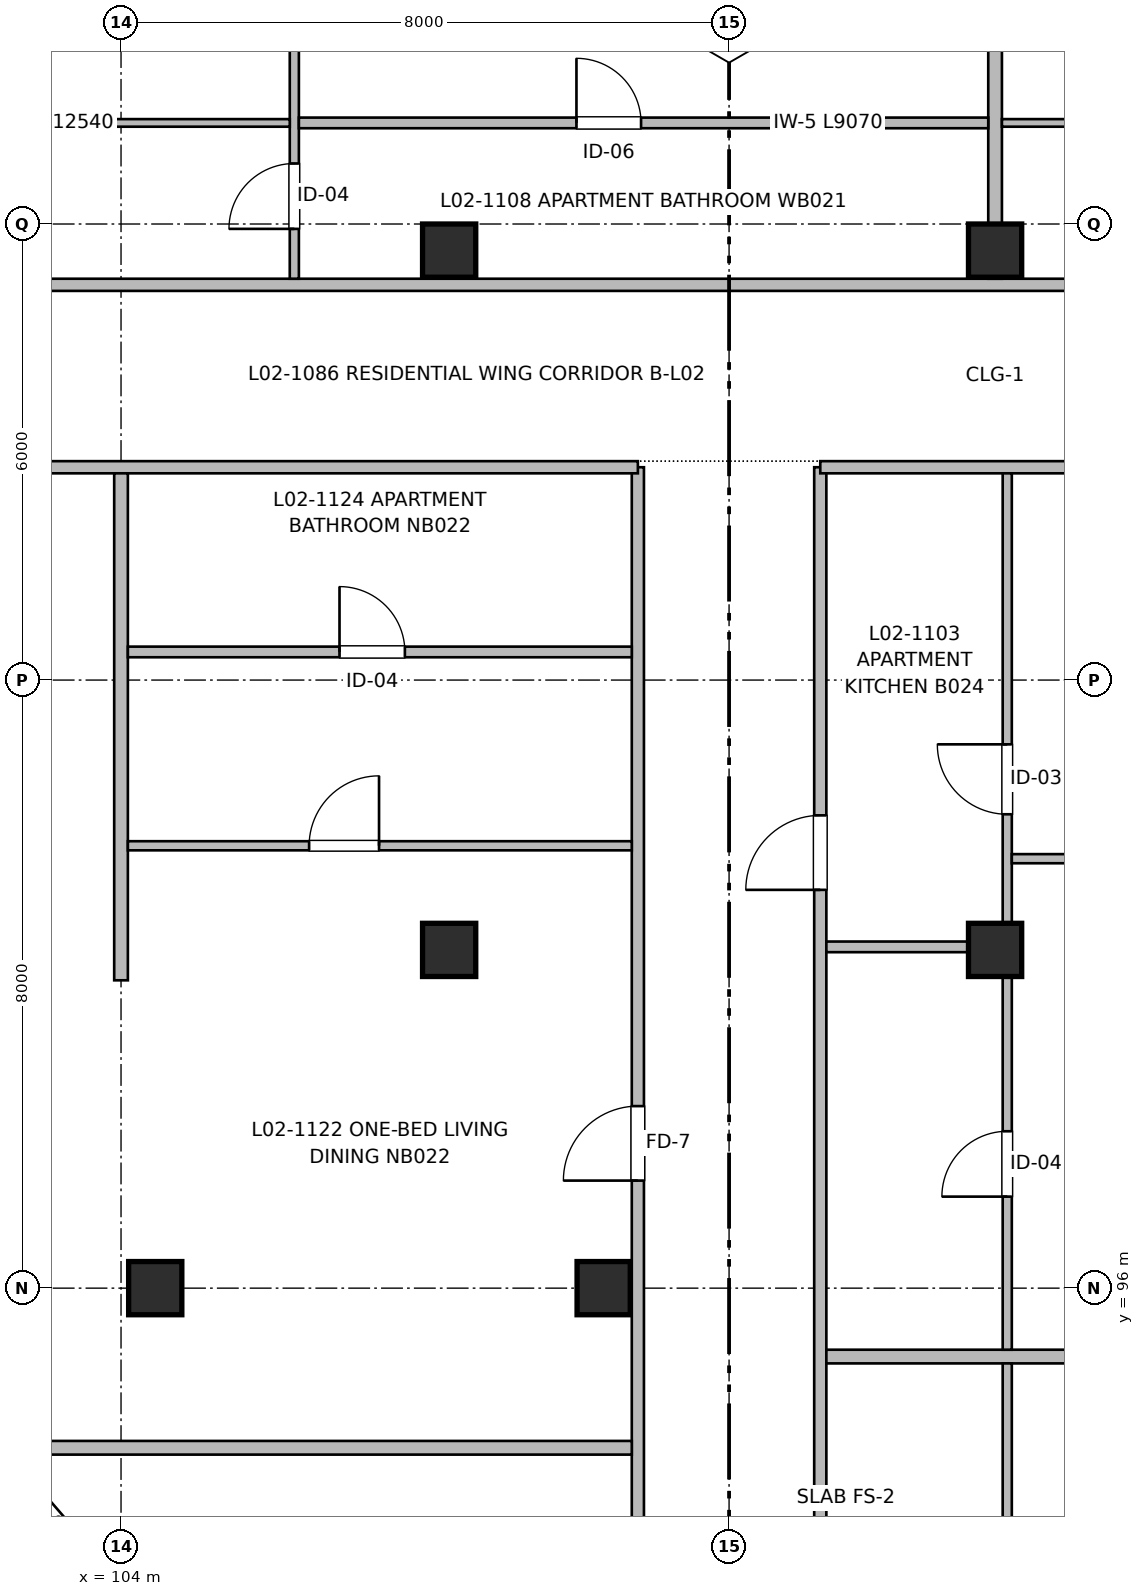
"""IFC4 building model, lengths in metres.
Left out: names, types, materials, properties, quantities, classifications, styles, units other than length and angle.
Written with IfcOpenShell. Run it as: python <this file> out.ifc"""

import sys

from ifc_helpers import new_model, si_unit, direction, frame, frame_2d, origin, origin_2d, place, context, subcontext, project, spatial, rectangle, extrude, element, fill, save


model = new_model("IFC4")
c1 = context("Model", 3, precision=1e-05, world=origin(), true_north=direction((0.0, 1.0)))
c2 = subcontext(c1, "Body", "Model", "MODEL_VIEW")
j1 = project(units=[si_unit("LENGTHUNIT", "METRE"), si_unit("PLANEANGLEUNIT", "RADIAN")], contexts=[c1])
p1 = place(None, origin())
s1 = spatial("IfcSite", under=j1, at=p1, CompositionType="ELEMENT")
p2 = place(p1, origin())
s2 = spatial("IfcBuilding", under=s1, at=p2, CompositionType="ELEMENT")
p3 = place(p2, frame((0.0, 0.0, 7.36)))
s3 = spatial("IfcBuildingStorey", under=s2, at=p3, CompositionType="ELEMENT", Elevation=7.36)
for number, where, z_axis, x_axis in (
    (1, (104.45, 96.0, 0.0), (0.0, 0.0, 1.0), (1.0, 0.0, 0.0)),
    (2, (108.317, 100.45, 0.0), (0.0, 0.0, 1.0), (1.0, 0.0, 0.0)),
    (3, (108.317, 109.65, 0.0), (0.0, 0.0, 1.0), (1.0, 0.0, 0.0)),
    (4, (110.35, 96.0, 0.0), (0.0, 0.0, 1.0), (1.0, 0.0, 0.0)),
    (5, (115.5, 100.45, 0.0), (0.0, 0.0, 1.0), (1.0, 0.0, 0.0)),
    (6, (115.5, 109.65, 0.0), (0.0, 0.0, 1.0), (1.0, 0.0, 0.0)),
):
    element("IfcColumn", number, at=place(p3, frame(where, z_axis=z_axis, x_axis=x_axis)), inside=s3, PredefinedType="COLUMN", context=c2, shape_type="SweptSolid", body=[
        extrude(rectangle(XDim=0.7, YDim=0.7, at=origin_2d()), origin(), (0.0, 0.0, 1.0), 3.2),
    ])
p4 = place(p3, frame((110.8, 56.18, 0.0), z_axis=(0.0, 0.0, 1.0), x_axis=(0.0, 1.0, 0.0)))
e7 = element("IfcWall", 7, at=p4, inside=s3, PredefinedType="PARTITIONING", context=c2, shape_type="SweptSolid", body=[
    extrude(rectangle(XDim=50.62, YDim=0.16, at=frame_2d((25.31, 0.0))), origin(), (0.0, 0.0, 1.0), 2.935),
])
p5 = place(p4, frame((12.82, 0.0, 0.0)))
e8 = element("IfcOpeningElement", 8, at=p5, cuts=e7, PredefinedType="OPENING", context=c2, shape_type="SweptSolid", body=[
    extrude(rectangle(XDim=1.1, YDim=2.15, at=frame_2d((0.55, 1.075))), frame((0.0, 0.09, 0.0), z_axis=(0.0, -1.0, 0.0), x_axis=(1.0, 0.0, 0.0)), (0.0, 0.0, 1.0), 0.18),
])
p6 = place(p4, frame((19.22, 0.0, 0.0)))
e9 = element("IfcOpeningElement", 9, at=p6, cuts=e7, PredefinedType="OPENING", context=c2, shape_type="SweptSolid", body=[
    extrude(rectangle(XDim=1.6, YDim=2.15, at=frame_2d((0.8, 1.075))), frame((0.0, 0.09, 0.0), z_axis=(0.0, -1.0, 0.0), x_axis=(1.0, 0.0, 0.0)), (0.0, 0.0, 1.0), 0.18),
])
p7 = place(p4, frame((1.8, 0.0, 0.0)))
e10 = element("IfcOpeningElement", 10, at=p7, cuts=e7, PredefinedType="OPENING", context=c2, shape_type="SweptSolid", body=[
    extrude(rectangle(XDim=0.96, YDim=2.15, at=frame_2d((0.48, 1.075))), frame((0.0, 0.09, 0.0), z_axis=(0.0, -1.0, 0.0), x_axis=(1.0, 0.0, 0.0)), (0.0, 0.0, 1.0), 0.18),
])
p8 = place(p4, frame((32.625, 0.0, 0.0)))
e11 = element("IfcOpeningElement", 11, at=p8, cuts=e7, PredefinedType="OPENING", context=c2, shape_type="SweptSolid", body=[
    extrude(rectangle(XDim=0.98, YDim=2.15, at=frame_2d((0.49, 1.075))), frame((0.0, 0.09, 0.0), z_axis=(0.0, -1.0, 0.0), x_axis=(1.0, 0.0, 0.0)), (0.0, 0.0, 1.0), 0.18),
])
p9 = place(p4, frame((41.235, 0.0, 0.0)))
e12 = element("IfcOpeningElement", 12, at=p9, cuts=e7, PredefinedType="OPENING", context=c2, shape_type="SweptSolid", body=[
    extrude(rectangle(XDim=0.98, YDim=2.15, at=frame_2d((0.49, 1.075))), frame((0.0, 0.09, 0.0), z_axis=(0.0, -1.0, 0.0), x_axis=(1.0, 0.0, 0.0)), (0.0, 0.0, 1.0), 0.18),
])
p10 = place(p3, frame((113.2, 56.18, 0.0), z_axis=(0.0, 0.0, 1.0), x_axis=(0.0, 1.0, 0.0)))
e13 = element("IfcWall", 13, at=p10, inside=s3, PredefinedType="PARTITIONING", context=c2, shape_type="SweptSolid", body=[
    extrude(rectangle(XDim=50.62, YDim=0.16, at=frame_2d((25.31, 0.0))), origin(), (0.0, 0.0, 1.0), 2.935),
])
p11 = place(p10, frame((6.99, 0.0, 0.0)))
e14 = element("IfcOpeningElement", 14, at=p11, cuts=e13, PredefinedType="OPENING", context=c2, shape_type="SweptSolid", body=[
    extrude(rectangle(XDim=0.98, YDim=2.15, at=frame_2d((0.49, 1.075))), frame((0.0, 0.09, 0.0), z_axis=(0.0, -1.0, 0.0), x_axis=(1.0, 0.0, 0.0)), (0.0, 0.0, 1.0), 0.18),
])
p12 = place(p10, frame((20.92, 0.0, 0.0)))
e15 = element("IfcOpeningElement", 15, at=p12, cuts=e13, PredefinedType="OPENING", context=c2, shape_type="SweptSolid", body=[
    extrude(rectangle(XDim=0.98, YDim=2.15, at=frame_2d((0.49, 1.075))), frame((0.0, 0.09, 0.0), z_axis=(0.0, -1.0, 0.0), x_axis=(1.0, 0.0, 0.0)), (0.0, 0.0, 1.0), 0.18),
])
p13 = place(p10, frame((33.67, 0.0, 0.0)))
e16 = element("IfcOpeningElement", 16, at=p13, cuts=e13, PredefinedType="OPENING", context=c2, shape_type="SweptSolid", body=[
    extrude(rectangle(XDim=0.98, YDim=2.15, at=frame_2d((0.49, 1.075))), frame((0.0, 0.09, 0.0), z_axis=(0.0, -1.0, 0.0), x_axis=(1.0, 0.0, 0.0)), (0.0, 0.0, 1.0), 0.18),
])
p14 = place(p10, frame((45.06, 0.0, 0.0)))
e17 = element("IfcOpeningElement", 17, at=p14, cuts=e13, PredefinedType="OPENING", context=c2, shape_type="SweptSolid", body=[
    extrude(rectangle(XDim=0.98, YDim=2.15, at=frame_2d((0.49, 1.075))), frame((0.0, 0.09, 0.0), z_axis=(0.0, -1.0, 0.0), x_axis=(1.0, 0.0, 0.0)), (0.0, 0.0, 1.0), 0.18),
])
p15 = place(p3, frame((93.68, 106.8, 0.0), z_axis=(0.0, 0.0, 1.0), x_axis=(1.0, 0.0, 0.0)))
e18 = element("IfcWall", 18, at=p15, inside=s3, PredefinedType="PARTITIONING", context=c2, shape_type="SweptSolid", body=[
    extrude(rectangle(XDim=17.12, YDim=0.16, at=frame_2d((8.56, 0.0))), origin(), (0.0, 0.0, 1.0), 2.935),
])
p16 = place(p3, frame((113.2, 106.8, 0.0), z_axis=(0.0, 0.0, 1.0), x_axis=(1.0, 0.0, 0.0)))
e19 = element("IfcWall", 19, at=p16, inside=s3, PredefinedType="PARTITIONING", context=c2, shape_type="SweptSolid", body=[
    extrude(rectangle(XDim=24.12, YDim=0.16, at=frame_2d((12.06, 0.0))), origin(), (0.0, 0.0, 1.0), 2.935),
])
p17 = place(p16, frame((19.575, 0.0, 0.0)))
e20 = element("IfcOpeningElement", 20, at=p17, cuts=e19, PredefinedType="OPENING", context=c2, shape_type="SweptSolid", body=[
    extrude(rectangle(XDim=1.05, YDim=2.15, at=frame_2d((0.525, 1.075))), frame((0.0, 0.09, 0.0), z_axis=(0.0, -1.0, 0.0), x_axis=(1.0, 0.0, 0.0)), (0.0, 0.0, 1.0), 0.18),
])
p18 = place(p16, frame((8.995, 0.0, 0.0)))
e21 = element("IfcOpeningElement", 21, at=p18, cuts=e19, PredefinedType="OPENING", context=c2, shape_type="SweptSolid", body=[
    extrude(rectangle(XDim=0.98, YDim=2.15, at=frame_2d((0.49, 1.075))), frame((0.0, 0.09, 0.0), z_axis=(0.0, -1.0, 0.0), x_axis=(1.0, 0.0, 0.0)), (0.0, 0.0, 1.0), 0.18),
])
p19 = place(p3, frame((93.68, 109.2, 0.0), z_axis=(0.0, 0.0, 1.0), x_axis=(1.0, 0.0, 0.0)))
e22 = element("IfcWall", 22, at=p19, inside=s3, PredefinedType="PARTITIONING", context=c2, shape_type="SweptSolid", body=[
    extrude(rectangle(XDim=43.64, YDim=0.16, at=frame_2d((21.82, 0.0))), origin(), (0.0, 0.0, 1.0), 2.935),
])
p20 = place(p19, frame((5.41, 0.0, 0.0)))
e23 = element("IfcOpeningElement", 23, at=p20, cuts=e22, PredefinedType="OPENING", context=c2, shape_type="SweptSolid", body=[
    extrude(rectangle(XDim=0.98, YDim=2.15, at=frame_2d((0.49, 1.075))), frame((0.0, 0.09, 0.0), z_axis=(0.0, -1.0, 0.0), x_axis=(1.0, 0.0, 0.0)), (0.0, 0.0, 1.0), 0.18),
])
p21 = place(p19, frame((27.32, 0.0, 0.0)))
e24 = element("IfcOpeningElement", 24, at=p21, cuts=e22, PredefinedType="OPENING", context=c2, shape_type="SweptSolid", body=[
    extrude(rectangle(XDim=0.98, YDim=2.15, at=frame_2d((0.49, 1.075))), frame((0.0, 0.09, 0.0), z_axis=(0.0, -1.0, 0.0), x_axis=(1.0, 0.0, 0.0)), (0.0, 0.0, 1.0), 0.18),
])
p22 = place(p3, frame((104.0, 100.05, 0.0), z_axis=(0.0, 0.0, 1.0), x_axis=(0.0, 1.0, 0.0)))
e25 = element("IfcWall", 25, at=p22, inside=s3, PredefinedType="PARTITIONING", context=c2, shape_type="SweptSolid", body=[
    extrude(rectangle(XDim=6.67, YDim=0.18, at=frame_2d((3.335, 0.0))), origin(), (0.0, 0.0, 1.0), 2.935),
])
p23 = place(p3, frame((113.28, 95.1, 0.0), z_axis=(0.0, 0.0, 1.0), x_axis=(1.0, 0.0, 0.0)))
e26 = element("IfcWall", 26, at=p23, inside=s3, PredefinedType="PARTITIONING", context=c2, shape_type="SweptSolid", body=[
    extrude(rectangle(XDim=12.887, YDim=0.18, at=frame_2d((6.444, 0.0))), origin(), (0.0, 0.0, 1.0), 2.935),
])
p24 = place(p3, frame((115.66, 84.07, 0.0), z_axis=(0.0, 0.0, 1.0), x_axis=(0.0, 1.0, 0.0)))
e27 = element("IfcWall", 27, at=p24, inside=s3, PredefinedType="PARTITIONING", context=c2, shape_type="SweptSolid", body=[
    extrude(rectangle(XDim=10.94, YDim=0.12, at=frame_2d((5.47, 0.0))), origin(), (0.0, 0.0, 1.0), 2.935),
])
p25 = place(p24, frame((1.911, 0.0, 0.0)))
e28 = element("IfcOpeningElement", 28, at=p25, cuts=e27, PredefinedType="OPENING", context=c2, shape_type="SweptSolid", body=[
    extrude(rectangle(XDim=0.86, YDim=2.1, at=frame_2d((0.43, 1.05))), frame((0.0, 0.07, 0.0), z_axis=(0.0, -1.0, 0.0), x_axis=(1.0, 0.0, 0.0)), (0.0, 0.0, 1.0), 0.14),
])
p26 = place(p24, frame((6.685, 0.0, 0.0)))
e29 = element("IfcOpeningElement", 29, at=p26, cuts=e27, PredefinedType="OPENING", context=c2, shape_type="SweptSolid", body=[
    extrude(rectangle(XDim=0.92, YDim=2.1, at=frame_2d((0.46, 1.05))), frame((0.0, 0.07, 0.0), z_axis=(0.0, -1.0, 0.0), x_axis=(1.0, 0.0, 0.0)), (0.0, 0.0, 1.0), 0.14),
])
p27 = place(p3, frame((115.66, 95.19, 0.0), z_axis=(0.0, 0.0, 1.0), x_axis=(0.0, 1.0, 0.0)))
e30 = element("IfcWall", 30, at=p27, inside=s3, PredefinedType="PARTITIONING", context=c2, shape_type="SweptSolid", body=[
    extrude(rectangle(XDim=11.53, YDim=0.12, at=frame_2d((5.765, 0.0))), origin(), (0.0, 0.0, 1.0), 2.68),
])
p28 = place(p27, frame((2.014, 0.0, 0.0)))
e31 = element("IfcOpeningElement", 31, at=p28, cuts=e30, PredefinedType="OPENING", context=c2, shape_type="SweptSolid", body=[
    extrude(rectangle(XDim=0.86, YDim=2.1, at=frame_2d((0.43, 1.05))), frame((0.0, 0.07, 0.0), z_axis=(0.0, -1.0, 0.0), x_axis=(1.0, 0.0, 0.0)), (0.0, 0.0, 1.0), 0.14),
])
p29 = place(p27, frame((7.044, 0.0, 0.0)))
e32 = element("IfcOpeningElement", 32, at=p29, cuts=e30, PredefinedType="OPENING", context=c2, shape_type="SweptSolid", body=[
    extrude(rectangle(XDim=0.92, YDim=2.1, at=frame_2d((0.46, 1.05))), frame((0.0, 0.07, 0.0), z_axis=(0.0, -1.0, 0.0), x_axis=(1.0, 0.0, 0.0)), (0.0, 0.0, 1.0), 0.14),
])
p30 = place(p3, frame((113.28, 100.49, 0.0), z_axis=(0.0, 0.0, 1.0), x_axis=(1.0, 0.0, 0.0)))
e33 = element("IfcWall", 33, at=p30, inside=s3, PredefinedType="PARTITIONING", context=c2, shape_type="SweptSolid", body=[
    extrude(rectangle(XDim=2.32, YDim=0.14, at=frame_2d((1.16, 0.0))), origin(), (0.0, 0.0, 1.0), 2.73),
])
p31 = place(p3, frame((115.72, 101.65, 0.0), z_axis=(0.0, 0.0, 1.0), x_axis=(1.0, 0.0, 0.0)))
e34 = element("IfcWall", 34, at=p31, inside=s3, PredefinedType="PARTITIONING", context=c2, shape_type="SweptSolid", body=[
    extrude(rectangle(XDim=4.19, YDim=0.12, at=frame_2d((2.095, 0.0))), origin(), (0.0, 0.0, 1.0), 2.935),
])
p32 = place(p31, frame((1.645, 0.0, 0.0)))
e35 = element("IfcOpeningElement", 35, at=p32, cuts=e34, PredefinedType="OPENING", context=c2, shape_type="SweptSolid", body=[
    extrude(rectangle(XDim=0.9, YDim=2.1, at=frame_2d((0.45, 1.05))), frame((0.0, 0.07, 0.0), z_axis=(0.0, -1.0, 0.0), x_axis=(1.0, 0.0, 0.0)), (0.0, 0.0, 1.0), 0.14),
])
p33 = place(p3, frame((115.5, 109.28, 0.0), z_axis=(0.0, 0.0, 1.0), x_axis=(0.0, 1.0, 0.0)))
e36 = element("IfcWall", 36, at=p33, inside=s3, PredefinedType="PARTITIONING", context=c2, shape_type="SweptSolid", body=[
    extrude(rectangle(XDim=6.59, YDim=0.18, at=frame_2d((3.295, 0.0))), origin(), (0.0, 0.0, 1.0), 2.68),
])
p34 = place(p3, frame((106.28, 109.28, 0.0), z_axis=(0.0, 0.0, 1.0), x_axis=(0.0, 1.0, 0.0)))
e37 = element("IfcWall", 37, at=p34, inside=s3, PredefinedType="PARTITIONING", context=c2, shape_type="SweptSolid", body=[
    extrude(rectangle(XDim=6.59, YDim=0.12, at=frame_2d((3.295, 0.0))), origin(), (0.0, 0.0, 1.0), 2.935),
])
p35 = place(p34, frame((0.656, 0.0, 0.0)))
e38 = element("IfcOpeningElement", 38, at=p35, cuts=e37, PredefinedType="OPENING", context=c2, shape_type="SweptSolid", body=[
    extrude(rectangle(XDim=0.86, YDim=2.1, at=frame_2d((0.43, 1.05))), frame((0.0, 0.07, 0.0), z_axis=(0.0, -1.0, 0.0), x_axis=(1.0, 0.0, 0.0)), (0.0, 0.0, 1.0), 0.14),
])
p36 = place(p34, frame((4.093, 0.0, 0.0)))
e39 = element("IfcOpeningElement", 39, at=p36, cuts=e37, PredefinedType="OPENING", context=c2, shape_type="SweptSolid", body=[
    extrude(rectangle(XDim=0.9, YDim=2.1, at=frame_2d((0.45, 1.05))), frame((0.0, 0.07, 0.0), z_axis=(0.0, -1.0, 0.0), x_axis=(1.0, 0.0, 0.0)), (0.0, 0.0, 1.0), 0.14),
])
p37 = place(p3, frame((106.34, 111.33, 0.0), z_axis=(0.0, 0.0, 1.0), x_axis=(1.0, 0.0, 0.0)))
e40 = element("IfcWall", 40, at=p37, inside=s3, PredefinedType="PARTITIONING", context=c2, shape_type="SweptSolid", body=[
    extrude(rectangle(XDim=9.07, YDim=0.14, at=frame_2d((4.535, 0.0))), origin(), (0.0, 0.0, 1.0), 2.935),
])
p38 = place(p37, frame((3.652, 0.0, 0.0)))
e41 = element("IfcOpeningElement", 41, at=p38, cuts=e40, PredefinedType="OPENING", context=c2, shape_type="SweptSolid", body=[
    extrude(rectangle(XDim=0.85, YDim=2.05, at=frame_2d((0.425, 1.025))), frame((0.0, 0.08, 0.0), z_axis=(0.0, -1.0, 0.0), x_axis=(1.0, 0.0, 0.0)), (0.0, 0.0, 1.0), 0.16),
])
p39 = place(p3, frame((93.68, 111.33, 0.0), z_axis=(0.0, 0.0, 1.0), x_axis=(1.0, 0.0, 0.0)))
e42 = element("IfcWall", 42, at=p39, inside=s3, PredefinedType="PARTITIONING", context=c2, shape_type="SweptSolid", body=[
    extrude(rectangle(XDim=12.54, YDim=0.1, at=frame_2d((6.27, 0.0))), origin(), (0.0, 0.0, 1.0), 2.935),
])
p40 = place(p39, frame((5.04, 0.0, 0.0)))
e43 = element("IfcOpeningElement", 43, at=p40, cuts=e42, PredefinedType="OPENING", context=c2, shape_type="SweptSolid", body=[
    extrude(rectangle(XDim=0.92, YDim=2.1, at=frame_2d((0.46, 1.05))), frame((0.0, 0.06, 0.0), z_axis=(0.0, -1.0, 0.0), x_axis=(1.0, 0.0, 0.0)), (0.0, 0.0, 1.0), 0.12),
])
p41 = place(p3, frame((115.59, 111.33, 0.0), z_axis=(0.0, 0.0, 1.0), x_axis=(1.0, 0.0, 0.0)))
e44 = element("IfcWall", 44, at=p41, inside=s3, PredefinedType="PARTITIONING", context=c2, shape_type="SweptSolid", body=[
    extrude(rectangle(XDim=12.54, YDim=0.1, at=frame_2d((6.27, 0.0))), origin(), (0.0, 0.0, 1.0), 2.935),
])
p42 = place(p41, frame((5.04, 0.0, 0.0)))
e45 = element("IfcOpeningElement", 45, at=p42, cuts=e44, PredefinedType="OPENING", context=c2, shape_type="SweptSolid", body=[
    extrude(rectangle(XDim=0.92, YDim=2.1, at=frame_2d((0.46, 1.05))), frame((0.0, 0.06, 0.0), z_axis=(0.0, -1.0, 0.0), x_axis=(1.0, 0.0, 0.0)), (0.0, 0.0, 1.0), 0.12),
])
p43 = place(p3, frame((102.411, 93.9, 0.0), z_axis=(0.0, 0.0, 1.0), x_axis=(1.0, 0.0, 0.0)))
e46 = element("IfcWall", 46, at=p43, inside=s3, PredefinedType="PARTITIONING", context=c2, shape_type="SweptSolid", body=[
    extrude(rectangle(XDim=8.309, YDim=0.18, at=frame_2d((4.155, 0.0))), origin(), (0.0, 0.0, 1.0), 2.935),
])
p44 = place(p3, frame((104.09, 101.82, 0.0), z_axis=(0.0, 0.0, 1.0), x_axis=(1.0, 0.0, 0.0)))
e47 = element("IfcWall", 47, at=p44, inside=s3, PredefinedType="PARTITIONING", context=c2, shape_type="SweptSolid", body=[
    extrude(rectangle(XDim=6.63, YDim=0.12, at=frame_2d((3.315, 0.0))), origin(), (0.0, 0.0, 1.0), 2.935),
])
p45 = place(p44, frame((2.385, 0.0, 0.0)))
e48 = element("IfcOpeningElement", 48, at=p45, cuts=e47, PredefinedType="OPENING", context=c2, shape_type="SweptSolid", body=[
    extrude(rectangle(XDim=0.92, YDim=2.1, at=frame_2d((0.46, 1.05))), frame((0.0, 0.07, 0.0), z_axis=(0.0, -1.0, 0.0), x_axis=(1.0, 0.0, 0.0)), (0.0, 0.0, 1.0), 0.14),
])
p46 = place(p3, frame((104.09, 104.37, 0.0), z_axis=(0.0, 0.0, 1.0), x_axis=(1.0, 0.0, 0.0)))
e49 = element("IfcWall", 49, at=p46, inside=s3, PredefinedType="PARTITIONING", context=c2, shape_type="SweptSolid", body=[
    extrude(rectangle(XDim=6.63, YDim=0.14, at=frame_2d((3.315, 0.0))), origin(), (0.0, 0.0, 1.0), 2.935),
])
p47 = place(p46, frame((2.785, 0.0, 0.0)))
e50 = element("IfcOpeningElement", 50, at=p47, cuts=e49, PredefinedType="OPENING", context=c2, shape_type="SweptSolid", body=[
    extrude(rectangle(XDim=0.86, YDim=2.1, at=frame_2d((0.43, 1.05))), frame((0.0, 0.08, 0.0), z_axis=(0.0, -1.0, 0.0), x_axis=(1.0, 0.0, 0.0)), (0.0, 0.0, 1.0), 0.16),
])
p48 = place(p28, origin())
e51 = element("IfcDoor", 51, at=p48, inside=s3, OperationType="SINGLE_SWING_LEFT", PredefinedType="DOOR", context=c2, shape_type="SweptSolid", body=[
    extrude(rectangle(XDim=0.86, YDim=2.1, at=frame_2d((0.43, 1.05))), frame((0.0, 0.025, 0.0), z_axis=(0.0, -1.0, 0.0), x_axis=(1.0, 0.0, 0.0)), (0.0, 0.0, 1.0), 0.05),
])
fill(e31, e51)
p49 = place(p29, origin())
e52 = element("IfcDoor", 52, at=p49, inside=s3, OperationType="SINGLE_SWING_RIGHT", PredefinedType="DOOR", context=c2, shape_type="SweptSolid", body=[
    extrude(rectangle(XDim=0.92, YDim=2.1, at=frame_2d((0.46, 1.05))), frame((0.0, 0.025, 0.0), z_axis=(0.0, -1.0, 0.0), x_axis=(1.0, 0.0, 0.0)), (0.0, 0.0, 1.0), 0.05),
])
fill(e32, e52)
p50 = place(p14, origin())
e53 = element("IfcDoor", 53, at=p50, inside=s3, OperationType="SINGLE_SWING_LEFT", PredefinedType="DOOR", context=c2, shape_type="SweptSolid", body=[
    extrude(rectangle(XDim=0.98, YDim=2.15, at=frame_2d((0.49, 1.075))), frame((0.0, 0.025, 0.0), z_axis=(0.0, -1.0, 0.0), x_axis=(1.0, 0.0, 0.0)), (0.0, 0.0, 1.0), 0.05),
])
fill(e17, e53)
p51 = place(p35, origin())
e54 = element("IfcDoor", 54, at=p51, inside=s3, OperationType="SINGLE_SWING_LEFT", PredefinedType="DOOR", context=c2, shape_type="SweptSolid", body=[
    extrude(rectangle(XDim=0.86, YDim=2.1, at=frame_2d((0.43, 1.05))), frame((0.0, 0.025, 0.0), z_axis=(0.0, -1.0, 0.0), x_axis=(1.0, 0.0, 0.0)), (0.0, 0.0, 1.0), 0.05),
])
fill(e38, e54)
p52 = place(p38, origin())
e55 = element("IfcDoor", 55, at=p52, inside=s3, OperationType="SINGLE_SWING_LEFT", PredefinedType="DOOR", context=c2, shape_type="SweptSolid", body=[
    extrude(rectangle(XDim=0.85, YDim=2.05, at=frame_2d((0.425, 1.025))), frame((0.0, 0.025, 0.0), z_axis=(0.0, -1.0, 0.0), x_axis=(1.0, 0.0, 0.0)), (0.0, 0.0, 1.0), 0.05),
])
fill(e41, e55)
p53 = place(p47, origin())
e56 = element("IfcDoor", 56, at=p53, inside=s3, OperationType="SINGLE_SWING_LEFT", PredefinedType="DOOR", context=c2, shape_type="SweptSolid", body=[
    extrude(rectangle(XDim=0.86, YDim=2.1, at=frame_2d((0.43, 1.05))), frame((0.0, 0.025, 0.0), z_axis=(0.0, -1.0, 0.0), x_axis=(1.0, 0.0, 0.0)), (0.0, 0.0, 1.0), 0.05),
])
fill(e50, e56)
p54 = place(p45, origin())
e57 = element("IfcDoor", 57, at=p54, inside=s3, OperationType="SINGLE_SWING_RIGHT", PredefinedType="DOOR", context=c2, shape_type="SweptSolid", body=[
    extrude(rectangle(XDim=0.92, YDim=2.1, at=frame_2d((0.46, 1.05))), frame((0.0, 0.025, 0.0), z_axis=(0.0, -1.0, 0.0), x_axis=(1.0, 0.0, 0.0)), (0.0, 0.0, 1.0), 0.05),
])
fill(e48, e57)
p55 = place(p9, origin())
e58 = element("IfcDoor", 58, at=p55, inside=s3, OperationType="SINGLE_SWING_LEFT", PredefinedType="DOOR", context=c2, shape_type="SweptSolid", body=[
    extrude(rectangle(XDim=0.98, YDim=2.15, at=frame_2d((0.49, 1.075))), frame((0.0, 0.025, 0.0), z_axis=(0.0, -1.0, 0.0), x_axis=(1.0, 0.0, 0.0)), (0.0, 0.0, 1.0), 0.05),
])
fill(e12, e58)
save(model, sys.argv[1])
